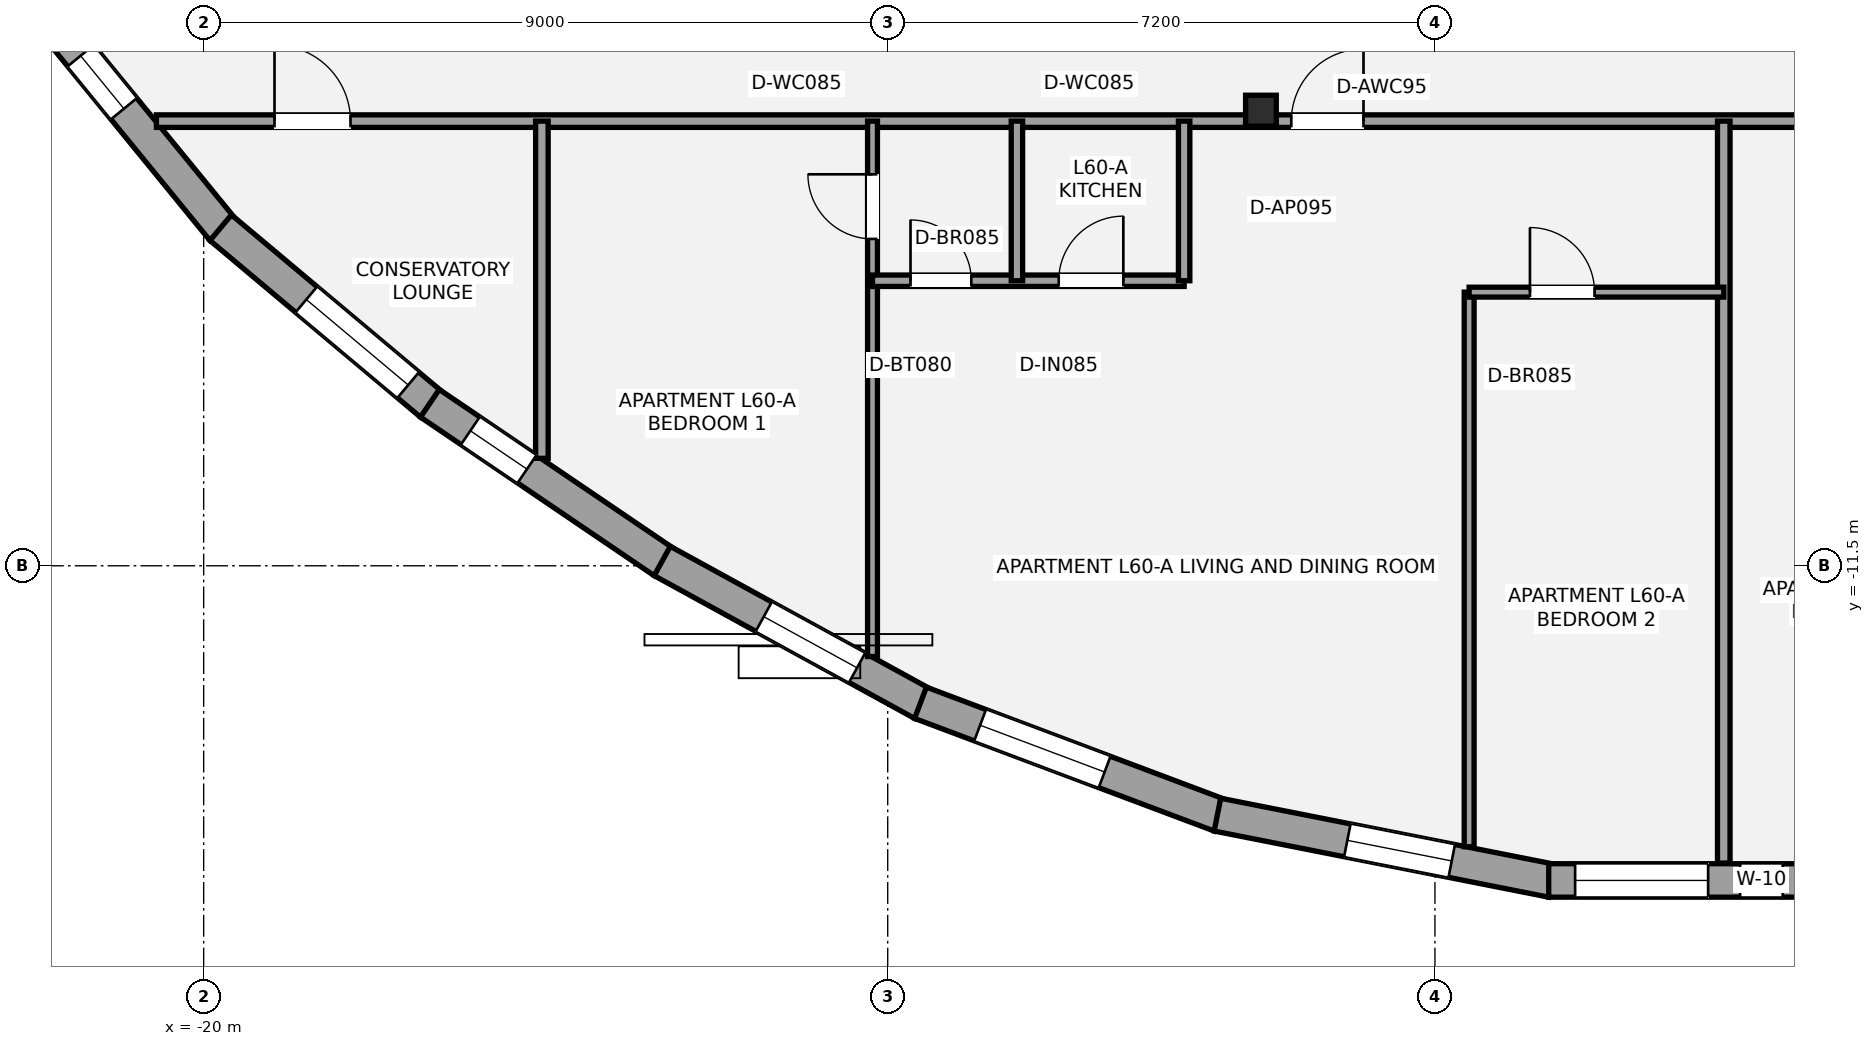
"""IFC4 building model, lengths in metres.
Left out: names, types, materials, properties, quantities, classifications, styles, units other than length and angle.
Written with IfcOpenShell. Run it as: python <this file> out.ifc"""

import sys

from ifc_helpers import new_model, si_unit, direction, frame, frame_2d, origin, origin_2d, place, context, subcontext, project, spatial, rectangle, i_section, extrude, element, fill, save


model = new_model("IFC4")
c1 = context("Model", 3, precision=1e-05, world=origin(), true_north=direction((0.0, 1.0)))
c2 = subcontext(c1, "Body", "Model", "MODEL_VIEW")
j1 = project(units=[si_unit("LENGTHUNIT", "METRE"), si_unit("PLANEANGLEUNIT", "RADIAN")], contexts=[c1])
p1 = place(None, origin())
s1 = spatial("IfcSite", under=j1, at=p1, CompositionType="ELEMENT")
p2 = place(p1, origin())
s2 = spatial("IfcBuilding", under=s1, at=p2, CompositionType="ELEMENT")
p3 = place(p2, frame((0.0, 0.0, 216.3)))
s3 = spatial("IfcBuildingStorey", under=s2, at=p3, CompositionType="ELEMENT", Elevation=216.3)
p4 = place(p3, frame((-6.09, -5.513, 0.0), z_axis=(0.0, 0.0, 1.0), x_axis=(1.0, 0.0, 0.0)))
e1 = element("IfcColumn", 1, at=p4, inside=s3, PredefinedType="COLUMN", context=c2, shape_type="SweptSolid", body=[
    extrude(i_section(OverallWidth=0.404, OverallDepth=0.407, WebThickness=0.027, FlangeThickness=0.044, at=origin_2d()), origin(), (0.0, 0.0, 1.0), 3.15),
])
p5 = place(p3, frame((-19.747, -7.081, 0.0), z_axis=(0.0, 0.0, 1.0), x_axis=(-0.632725461905, 0.774376194015, 0.0)))
e2 = element("IfcWall", 2, at=p5, inside=s3, PredefinedType="STANDARD", context=c2, shape_type="SweptSolid", body=[
    extrude(rectangle(XDim=3.452, YDim=0.44, at=frame_2d((1.726, 0.0))), origin(), (0.0, 0.0, 1.0), 2.336),
])
p6 = place(p5, frame((2.059, 0.0, 0.58)))
e3 = element("IfcOpeningElement", 3, at=p6, cuts=e2, PredefinedType="OPENING", context=c2, shape_type="SweptSolid", body=[
    extrude(rectangle(XDim=0.9, YDim=1.35, at=frame_2d((0.45, 0.675))), frame((0.0, 0.23, 0.0), z_axis=(0.0, -1.0, 0.0), x_axis=(1.0, 0.0, 0.0)), (0.0, 0.0, 1.0), 0.46),
])
p7 = place(p3, frame((-17.006, -9.376, 0.0), z_axis=(0.0, 0.0, 1.0), x_axis=(-0.766063904081, 0.642764416302, 0.0)))
e4 = element("IfcWall", 4, at=p7, inside=s3, PredefinedType="STANDARD", context=c2, shape_type="SweptSolid", body=[
    extrude(rectangle(XDim=3.615, YDim=0.44, at=frame_2d((1.808, 0.0))), origin(), (0.0, 0.0, 1.0), 2.336),
])
p8 = place(p7, frame((0.396, 0.0, 0.55)))
e5 = element("IfcOpeningElement", 5, at=p8, cuts=e4, PredefinedType="OPENING", context=c2, shape_type="SweptSolid", body=[
    extrude(rectangle(XDim=1.75, YDim=1.55, at=frame_2d((0.875, 0.775))), frame((0.0, 0.23, 0.0), z_axis=(0.0, -1.0, 0.0), x_axis=(1.0, 0.0, 0.0)), (0.0, 0.0, 1.0), 0.46),
])
p9 = place(p3, frame((-13.949, -11.448, 0.0), z_axis=(0.0, 0.0, 1.0), x_axis=(-0.827595704154, 0.561324639105, 0.0)))
e6 = element("IfcWall", 6, at=p9, inside=s3, PredefinedType="STANDARD", context=c2, shape_type="SweptSolid", body=[
    extrude(rectangle(XDim=3.715, YDim=0.44, at=frame_2d((1.858, 0.0))), origin(), (0.0, 0.0, 1.0), 2.336),
])
p10 = place(p9, frame((2.172, 0.0, 0.58)))
e7 = element("IfcOpeningElement", 7, at=p10, cuts=e6, PredefinedType="OPENING", context=c2, shape_type="SweptSolid", body=[
    extrude(rectangle(XDim=0.9, YDim=1.35, at=frame_2d((0.45, 0.675))), frame((0.0, 0.23, 0.0), z_axis=(0.0, -1.0, 0.0), x_axis=(1.0, 0.0, 0.0)), (0.0, 0.0, 1.0), 0.46),
])
p11 = place(p3, frame((-10.54, -13.315, 0.0), z_axis=(0.0, 0.0, 1.0), x_axis=(-0.87688122565, 0.480707100117, 0.0)))
e8 = element("IfcWall", 8, at=p11, inside=s3, PredefinedType="STANDARD", context=c2, shape_type="SweptSolid", body=[
    extrude(rectangle(XDim=3.908, YDim=0.44, at=frame_2d((1.954, 0.0))), origin(), (0.0, 0.0, 1.0), 2.336),
])
p12 = place(p11, frame((0.984, 0.0, 0.55)))
e9 = element("IfcOpeningElement", 9, at=p12, cuts=e8, PredefinedType="OPENING", context=c2, shape_type="SweptSolid", body=[
    extrude(rectangle(XDim=1.4, YDim=1.55, at=frame_2d((0.7, 0.775))), frame((0.0, 0.23, 0.0), z_axis=(0.0, -1.0, 0.0), x_axis=(1.0, 0.0, 0.0)), (0.0, 0.0, 1.0), 0.46),
])
p13 = place(p3, frame((-6.627, -14.784, 0.0), z_axis=(0.0, 0.0, 1.0), x_axis=(-0.936069207768, 0.351815915314, 0.0)))
e10 = element("IfcWall", 10, at=p13, inside=s3, PredefinedType="STANDARD", context=c2, shape_type="SweptSolid", body=[
    extrude(rectangle(XDim=4.211, YDim=0.44, at=frame_2d((2.105, 0.0))), origin(), (0.0, 0.0, 1.0), 2.336),
])
p14 = place(p13, frame((1.623, 0.0, 0.55)))
e11 = element("IfcOpeningElement", 11, at=p14, cuts=e10, PredefinedType="OPENING", context=c2, shape_type="SweptSolid", body=[
    extrude(rectangle(XDim=1.75, YDim=1.55, at=frame_2d((0.875, 0.775))), frame((0.0, 0.23, 0.0), z_axis=(0.0, -1.0, 0.0), x_axis=(1.0, 0.0, 0.0)), (0.0, 0.0, 1.0), 0.46),
])
p15 = place(p3, frame((-2.26, -15.644, 0.0), z_axis=(0.0, 0.0, 1.0), x_axis=(-0.981032244947, 0.193844613996, 0.0)))
e12 = element("IfcWall", 12, at=p15, inside=s3, PredefinedType="STANDARD", context=c2, shape_type="SweptSolid", body=[
    extrude(rectangle(XDim=4.486, YDim=0.44, at=frame_2d((2.243, 0.0))), origin(), (0.0, 0.0, 1.0), 2.336),
])
p16 = place(p15, frame((1.344, 0.0, 0.58)))
e13 = element("IfcOpeningElement", 13, at=p16, cuts=e12, PredefinedType="OPENING", context=c2, shape_type="SweptSolid", body=[
    extrude(rectangle(XDim=1.4, YDim=1.55, at=frame_2d((0.7, 0.775))), frame((0.0, 0.23, 0.0), z_axis=(0.0, -1.0, 0.0), x_axis=(1.0, 0.0, 0.0)), (0.0, 0.0, 1.0), 0.46),
])
p17 = place(p3, frame((2.303, -15.64, 0.0), z_axis=(0.0, 0.0, 1.0), x_axis=(-1.0, 0.0, 0.0)))
e14 = element("IfcWall", 14, at=p17, inside=s3, PredefinedType="STANDARD", context=c2, shape_type="SweptSolid", body=[
    extrude(rectangle(XDim=4.606, YDim=0.44, at=frame_2d((2.303, 0.0))), origin(), (0.0, 0.0, 1.0), 2.336),
])
p18 = place(p17, frame((2.509, 0.0, 0.55)))
e15 = element("IfcOpeningElement", 15, at=p18, cuts=e14, PredefinedType="OPENING", context=c2, shape_type="SweptSolid", body=[
    extrude(rectangle(XDim=1.75, YDim=1.55, at=frame_2d((0.875, 0.775))), frame((0.0, 0.23, 0.0), z_axis=(0.0, -1.0, 0.0), x_axis=(1.0, 0.0, 0.0)), (0.0, 0.0, 1.0), 0.46),
])
p19 = place(p17, frame((1.528, 0.0, 0.42)))
e16 = element("IfcOpeningElement", 16, at=p19, cuts=e14, PredefinedType="OPENING", context=c2, shape_type="SweptSolid", body=[
    extrude(rectangle(XDim=0.56, YDim=1.15, at=frame_2d((0.28, 0.575))), frame((0.0, 0.23, 0.0), z_axis=(0.0, -1.0, 0.0), x_axis=(1.0, 0.0, 0.0)), (0.0, 0.0, 1.0), 0.46),
])
p20 = place(p3, frame((-20.622, -5.65, 0.0), z_axis=(0.0, 0.0, 1.0), x_axis=(1.0, 0.0, 0.0)))
e17 = element("IfcWall", 17, at=p20, inside=s3, PredefinedType="PARTITIONING", context=c2, shape_type="SweptSolid", body=[
    extrude(rectangle(XDim=41.244, YDim=0.165, at=frame_2d((20.622, 0.0))), origin(), (0.0, 0.0, 1.0), 2.357),
])
p21 = place(p20, frame((1.554, 0.0, 0.0)))
e18 = element("IfcOpeningElement", 18, at=p21, cuts=e17, PredefinedType="OPENING", context=c2, shape_type="SweptSolid", body=[
    extrude(rectangle(XDim=1.0, YDim=2.15, at=frame_2d((0.5, 1.075))), frame((0.0, 0.093, 0.0), z_axis=(0.0, -1.0, 0.0), x_axis=(1.0, 0.0, 0.0)), (0.0, 0.0, 1.0), 0.185),
])
p22 = place(p20, frame((38.69, 0.0, 0.0)))
e19 = element("IfcOpeningElement", 19, at=p22, cuts=e17, PredefinedType="OPENING", context=c2, shape_type="SweptSolid", body=[
    extrude(rectangle(XDim=1.0, YDim=2.15, at=frame_2d((0.5, 1.075))), frame((0.0, 0.093, 0.0), z_axis=(0.0, -1.0, 0.0), x_axis=(1.0, 0.0, 0.0)), (0.0, 0.0, 1.0), 0.185),
])
p23 = place(p20, frame((14.932, 0.0, 0.0)))
e20 = element("IfcOpeningElement", 20, at=p23, cuts=e17, PredefinedType="OPENING", context=c2, shape_type="SweptSolid", body=[
    extrude(rectangle(XDim=0.95, YDim=2.15, at=frame_2d((0.475, 1.075))), frame((0.0, 0.093, 0.0), z_axis=(0.0, -1.0, 0.0), x_axis=(1.0, 0.0, 0.0)), (0.0, 0.0, 1.0), 0.185),
])
p24 = place(p20, frame((28.522, 0.0, 0.0)))
e21 = element("IfcOpeningElement", 21, at=p24, cuts=e17, PredefinedType="OPENING", context=c2, shape_type="SweptSolid", body=[
    extrude(rectangle(XDim=0.95, YDim=2.15, at=frame_2d((0.475, 1.075))), frame((0.0, 0.093, 0.0), z_axis=(0.0, -1.0, 0.0), x_axis=(1.0, 0.0, 0.0)), (0.0, 0.0, 1.0), 0.185),
])
p25 = place(p3, frame((-15.55, -10.086, 0.0), z_axis=(0.0, 0.0, 1.0), x_axis=(0.0, 1.0, 0.0)))
e22 = element("IfcWall", 22, at=p25, inside=s3, PredefinedType="PARTITIONING", context=c2, shape_type="SweptSolid", body=[
    extrude(rectangle(XDim=4.437, YDim=0.165, at=frame_2d((2.218, 0.0))), origin(), (0.0, 0.0, 1.0), 2.423),
])
p26 = place(p3, frame((0.0, -15.412, 0.0), z_axis=(0.0, 0.0, 1.0), x_axis=(0.0, 1.0, 0.0)))
e23 = element("IfcWall", 23, at=p26, inside=s3, PredefinedType="PARTITIONING", context=c2, shape_type="SweptSolid", body=[
    extrude(rectangle(XDim=9.762, YDim=0.165, at=frame_2d((4.881, 0.0))), origin(), (0.0, 0.0, 1.0), 2.423),
])
p27 = place(p3, frame((-11.2, -12.694, 0.0), z_axis=(0.0, 0.0, 1.0), x_axis=(0.0, 1.0, 0.0)))
e24 = element("IfcWall", 24, at=p27, inside=s3, PredefinedType="PARTITIONING", context=c2, shape_type="SweptSolid", body=[
    extrude(rectangle(XDim=7.044, YDim=0.13, at=frame_2d((3.522, 0.0))), origin(), (0.0, 0.0, 1.0), 2.423),
])
p28 = place(p27, frame((5.494, 0.0, 0.0)))
e25 = element("IfcOpeningElement", 25, at=p28, cuts=e24, PredefinedType="OPENING", context=c2, shape_type="SweptSolid", body=[
    extrude(rectangle(XDim=0.85, YDim=2.1, at=frame_2d((0.425, 1.05))), frame((0.0, 0.075, 0.0), z_axis=(0.0, -1.0, 0.0), x_axis=(1.0, 0.0, 0.0)), (0.0, 0.0, 1.0), 0.15),
])
p29 = place(p3, frame((-11.2, -7.75, 0.0), z_axis=(0.0, 0.0, 1.0), x_axis=(1.0, 0.0, 0.0)))
e26 = element("IfcWall", 26, at=p29, inside=s3, PredefinedType="PLUMBINGWALL", context=c2, shape_type="SweptSolid", body=[
    extrude(rectangle(XDim=4.1, YDim=0.15, at=frame_2d((2.05, 0.0))), origin(), (0.0, 0.0, 1.0), 2.423),
])
p30 = place(p29, frame((0.5, 0.0, 0.0)))
e27 = element("IfcOpeningElement", 27, at=p30, cuts=e26, PredefinedType="OPENING", context=c2, shape_type="SweptSolid", body=[
    extrude(rectangle(XDim=0.8, YDim=2.1, at=frame_2d((0.4, 1.05))), frame((0.0, 0.085, 0.0), z_axis=(0.0, -1.0, 0.0), x_axis=(1.0, 0.0, 0.0)), (0.0, 0.0, 1.0), 0.17),
])
p31 = place(p29, frame((2.45, 0.0, 0.0)))
e28 = element("IfcOpeningElement", 28, at=p31, cuts=e26, PredefinedType="OPENING", context=c2, shape_type="SweptSolid", body=[
    extrude(rectangle(XDim=0.85, YDim=2.1, at=frame_2d((0.425, 1.05))), frame((0.0, 0.085, 0.0), z_axis=(0.0, -1.0, 0.0), x_axis=(1.0, 0.0, 0.0)), (0.0, 0.0, 1.0), 0.17),
])
p32 = place(p3, frame((-9.3, -7.75, 0.0), z_axis=(0.0, 0.0, 1.0), x_axis=(0.0, 1.0, 0.0)))
e29 = element("IfcWall", 29, at=p32, inside=s3, PredefinedType="PLUMBINGWALL", context=c2, shape_type="SweptSolid", body=[
    extrude(rectangle(XDim=2.1, YDim=0.15, at=frame_2d((1.05, 0.0))), origin(), (0.0, 0.0, 1.0), 2.97),
])
p33 = place(p3, frame((-7.1, -7.75, 0.0), z_axis=(0.0, 0.0, 1.0), x_axis=(0.0, 1.0, 0.0)))
e30 = element("IfcWall", 30, at=p33, inside=s3, PredefinedType="PLUMBINGWALL", context=c2, shape_type="SweptSolid", body=[
    extrude(rectangle(XDim=2.1, YDim=0.15, at=frame_2d((1.05, 0.0))), origin(), (0.0, 0.0, 1.0), 2.423),
])
p34 = place(p3, frame((-3.35, -15.196, 0.0), z_axis=(0.0, 0.0, 1.0), x_axis=(0.0, 1.0, 0.0)))
e31 = element("IfcWall", 31, at=p34, inside=s3, PredefinedType="PARTITIONING", context=c2, shape_type="SweptSolid", body=[
    extrude(rectangle(XDim=7.296, YDim=0.13, at=frame_2d((3.648, 0.0))), origin(), (0.0, 0.0, 1.0), 2.423),
])
p35 = place(p3, frame((-3.35, -7.9, 0.0), z_axis=(0.0, 0.0, 1.0), x_axis=(1.0, 0.0, 0.0)))
e32 = element("IfcWall", 32, at=p35, inside=s3, PredefinedType="PARTITIONING", context=c2, shape_type="SweptSolid", body=[
    extrude(rectangle(XDim=3.35, YDim=0.13, at=frame_2d((1.675, 0.0))), origin(), (0.0, 0.0, 1.0), 2.423),
])
p36 = place(p35, frame((0.8, 0.0, 0.0)))
e33 = element("IfcOpeningElement", 33, at=p36, cuts=e32, PredefinedType="OPENING", context=c2, shape_type="SweptSolid", body=[
    extrude(rectangle(XDim=0.85, YDim=2.1, at=frame_2d((0.425, 1.05))), frame((0.0, 0.075, 0.0), z_axis=(0.0, -1.0, 0.0), x_axis=(1.0, 0.0, 0.0)), (0.0, 0.0, 1.0), 0.15),
])
p37 = place(p6, origin())
e34 = element("IfcWindow", 34, at=p37, inside=s3, PartitioningType="SINGLE_PANEL", PredefinedType="WINDOW", context=c2, shape_type="SweptSolid", body=[
    extrude(rectangle(XDim=0.9, YDim=1.35, at=frame_2d((0.45, 0.675))), frame((0.0, -0.01, 0.0), z_axis=(0.0, -1.0, 0.0), x_axis=(1.0, 0.0, 0.0)), (0.0, 0.0, 1.0), 0.06),
])
fill(e3, e34)
p38 = place(p8, origin())
e35 = element("IfcWindow", 35, at=p38, inside=s3, PartitioningType="SINGLE_PANEL", PredefinedType="WINDOW", context=c2, shape_type="SweptSolid", body=[
    extrude(rectangle(XDim=1.75, YDim=1.55, at=frame_2d((0.875, 0.775))), frame((0.0, -0.01, 0.0), z_axis=(0.0, -1.0, 0.0), x_axis=(1.0, 0.0, 0.0)), (0.0, 0.0, 1.0), 0.06),
])
fill(e5, e35)
p39 = place(p10, origin())
e36 = element("IfcWindow", 36, at=p39, inside=s3, PartitioningType="SINGLE_PANEL", PredefinedType="WINDOW", context=c2, shape_type="SweptSolid", body=[
    extrude(rectangle(XDim=0.9, YDim=1.35, at=frame_2d((0.45, 0.675))), frame((0.0, -0.01, 0.0), z_axis=(0.0, -1.0, 0.0), x_axis=(1.0, 0.0, 0.0)), (0.0, 0.0, 1.0), 0.06),
])
fill(e7, e36)
p40 = place(p12, origin())
e37 = element("IfcWindow", 37, at=p40, inside=s3, PartitioningType="SINGLE_PANEL", PredefinedType="WINDOW", context=c2, shape_type="SweptSolid", body=[
    extrude(rectangle(XDim=1.4, YDim=1.55, at=frame_2d((0.7, 0.775))), frame((0.0, -0.01, 0.0), z_axis=(0.0, -1.0, 0.0), x_axis=(1.0, 0.0, 0.0)), (0.0, 0.0, 1.0), 0.06),
])
fill(e9, e37)
p41 = place(p14, origin())
e38 = element("IfcWindow", 38, at=p41, inside=s3, PartitioningType="SINGLE_PANEL", PredefinedType="WINDOW", context=c2, shape_type="SweptSolid", body=[
    extrude(rectangle(XDim=1.75, YDim=1.55, at=frame_2d((0.875, 0.775))), frame((0.0, -0.01, 0.0), z_axis=(0.0, -1.0, 0.0), x_axis=(1.0, 0.0, 0.0)), (0.0, 0.0, 1.0), 0.06),
])
fill(e11, e38)
p42 = place(p16, origin())
e39 = element("IfcWindow", 39, at=p42, inside=s3, PartitioningType="SINGLE_PANEL", PredefinedType="WINDOW", context=c2, shape_type="SweptSolid", body=[
    extrude(rectangle(XDim=1.4, YDim=1.55, at=frame_2d((0.7, 0.775))), frame((0.0, -0.01, 0.0), z_axis=(0.0, -1.0, 0.0), x_axis=(1.0, 0.0, 0.0)), (0.0, 0.0, 1.0), 0.06),
])
fill(e13, e39)
p43 = place(p18, origin())
e40 = element("IfcWindow", 40, at=p43, inside=s3, PartitioningType="SINGLE_PANEL", PredefinedType="WINDOW", context=c2, shape_type="SweptSolid", body=[
    extrude(rectangle(XDim=1.75, YDim=1.55, at=frame_2d((0.875, 0.775))), frame((0.0, -0.01, 0.0), z_axis=(0.0, -1.0, 0.0), x_axis=(1.0, 0.0, 0.0)), (0.0, 0.0, 1.0), 0.06),
])
fill(e15, e40)
p44 = place(p19, origin())
e41 = element("IfcWindow", 41, at=p44, inside=s3, PartitioningType="SINGLE_PANEL", PredefinedType="WINDOW", context=c2, shape_type="SweptSolid", body=[
    extrude(rectangle(XDim=0.56, YDim=1.15, at=frame_2d((0.28, 0.575))), frame((0.0, -0.01, 0.0), z_axis=(0.0, -1.0, 0.0), x_axis=(1.0, 0.0, 0.0)), (0.0, 0.0, 1.0), 0.06),
])
fill(e16, e41)
p45 = place(p21, origin())
e42 = element("IfcDoor", 42, at=p45, inside=s3, OperationType="SINGLE_SWING_LEFT", PredefinedType="DOOR", context=c2, shape_type="SweptSolid", body=[
    extrude(rectangle(XDim=1.0, YDim=2.15, at=frame_2d((0.5, 1.075))), frame((0.0, 0.025, 0.0), z_axis=(0.0, -1.0, 0.0), x_axis=(1.0, 0.0, 0.0)), (0.0, 0.0, 1.0), 0.05),
])
fill(e18, e42)
p46 = place(p28, origin())
e43 = element("IfcDoor", 43, at=p46, inside=s3, OperationType="SINGLE_SWING_RIGHT", PredefinedType="DOOR", context=c2, shape_type="SweptSolid", body=[
    extrude(rectangle(XDim=0.85, YDim=2.1, at=frame_2d((0.425, 1.05))), frame((0.0, 0.025, 0.0), z_axis=(0.0, -1.0, 0.0), x_axis=(1.0, 0.0, 0.0)), (0.0, 0.0, 1.0), 0.05),
])
fill(e25, e43)
p47 = place(p30, origin())
e44 = element("IfcDoor", 44, at=p47, inside=s3, OperationType="SINGLE_SWING_LEFT", PredefinedType="DOOR", context=c2, shape_type="SweptSolid", body=[
    extrude(rectangle(XDim=0.8, YDim=2.1, at=frame_2d((0.4, 1.05))), frame((0.0, 0.025, 0.0), z_axis=(0.0, -1.0, 0.0), x_axis=(1.0, 0.0, 0.0)), (0.0, 0.0, 1.0), 0.05),
])
fill(e27, e44)
p48 = place(p31, origin())
e45 = element("IfcDoor", 45, at=p48, inside=s3, OperationType="SINGLE_SWING_RIGHT", PredefinedType="DOOR", context=c2, shape_type="SweptSolid", body=[
    extrude(rectangle(XDim=0.85, YDim=2.1, at=frame_2d((0.425, 1.05))), frame((0.0, 0.025, 0.0), z_axis=(0.0, -1.0, 0.0), x_axis=(1.0, 0.0, 0.0)), (0.0, 0.0, 1.0), 0.05),
])
fill(e28, e45)
p49 = place(p23, origin())
e46 = element("IfcDoor", 46, at=p49, inside=s3, OperationType="SINGLE_SWING_RIGHT", PredefinedType="DOOR", context=c2, shape_type="SweptSolid", body=[
    extrude(rectangle(XDim=0.95, YDim=2.15, at=frame_2d((0.475, 1.075))), frame((0.0, 0.025, 0.0), z_axis=(0.0, -1.0, 0.0), x_axis=(1.0, 0.0, 0.0)), (0.0, 0.0, 1.0), 0.05),
])
fill(e20, e46)
p50 = place(p36, origin())
e47 = element("IfcDoor", 47, at=p50, inside=s3, OperationType="SINGLE_SWING_LEFT", PredefinedType="DOOR", context=c2, shape_type="SweptSolid", body=[
    extrude(rectangle(XDim=0.85, YDim=2.1, at=frame_2d((0.425, 1.05))), frame((0.0, 0.025, 0.0), z_axis=(0.0, -1.0, 0.0), x_axis=(1.0, 0.0, 0.0)), (0.0, 0.0, 1.0), 0.05),
])
fill(e33, e47)
save(model, sys.argv[1])
